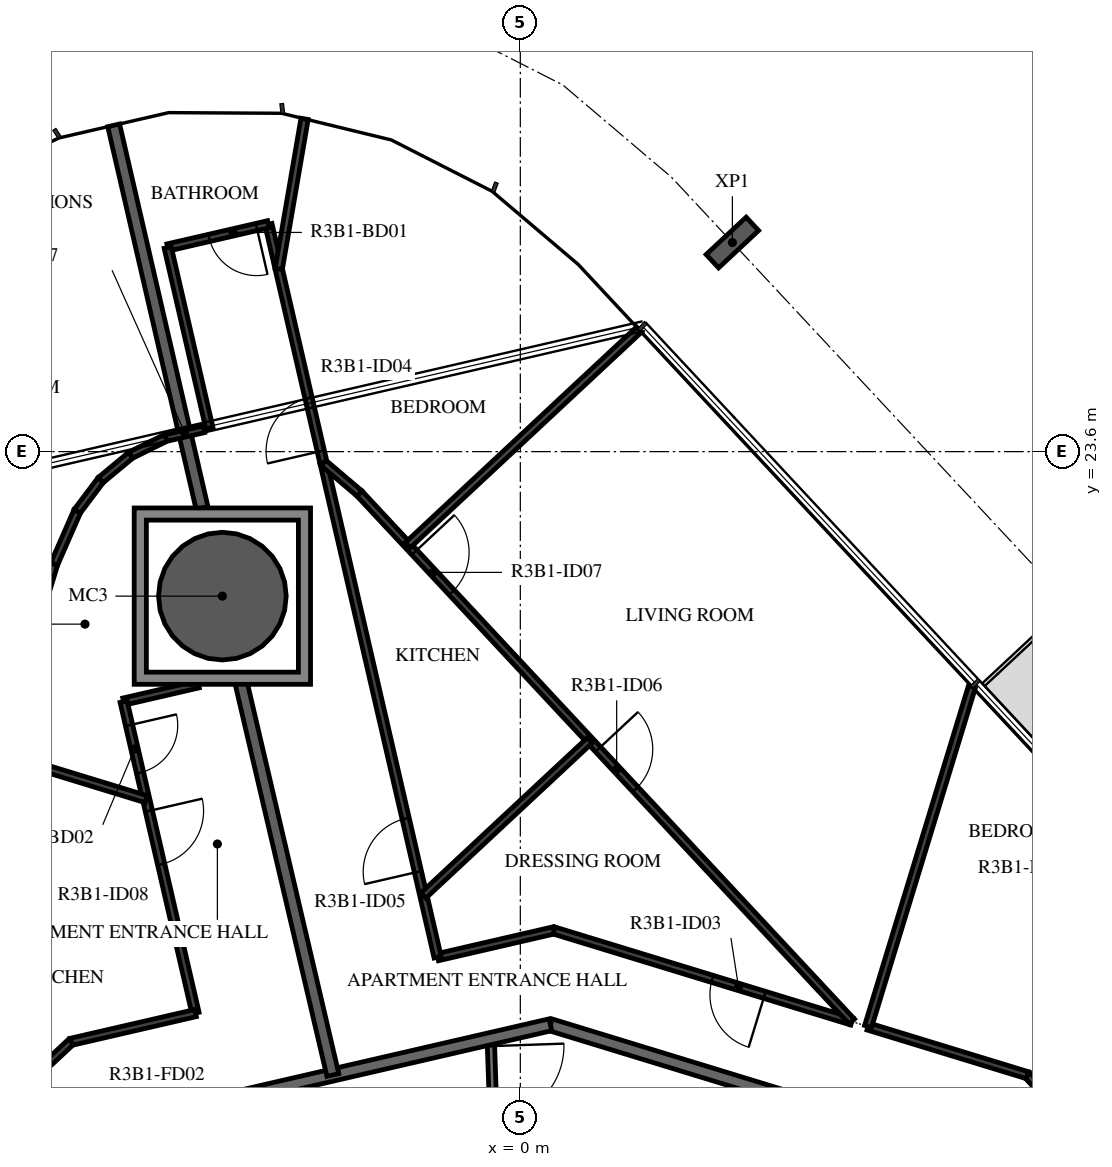
"""IFC4 building model, lengths in metres.
Left out: names, types, materials, properties, quantities, classifications, styles, units other than length and angle.
Written with IfcOpenShell. Run it as: python <this file> out.ifc"""

import sys

from ifc_helpers import new_model, si_unit, direction, frame, frame_2d, origin, origin_2d, place, context, subcontext, project, spatial, polyline, rectangle, hollow_circle, i_section, outline, extrude, element, fill, save


model = new_model("IFC4")
c1 = context("Model", 3, precision=1e-05, world=origin(), true_north=direction((0.0, 1.0)))
c2 = subcontext(c1, "Body", "Model", "MODEL_VIEW")
j1 = project(units=[si_unit("LENGTHUNIT", "METRE"), si_unit("PLANEANGLEUNIT", "RADIAN")], contexts=[c1])
p1 = place(None, origin())
s1 = spatial("IfcSite", under=j1, at=p1, CompositionType="ELEMENT")
p2 = place(p1, origin())
s2 = spatial("IfcBuilding", under=s1, at=p2, CompositionType="ELEMENT")
p3 = place(p2, frame((0.0, 0.0, 123.9)))
s3 = spatial("IfcBuildingStorey", under=s2, at=p3, CompositionType="ELEMENT", Elevation=123.9)
p4 = place(p3, frame((-4.9, 21.223, -0.38), z_axis=(0.0, 0.0, 1.0), x_axis=(1.0, 0.0, 0.0)))
e1 = element("IfcColumn", 1, at=p4, inside=s3, PredefinedType="COLUMN", context=c2, shape_type="SweptSolid", body=[
    extrude(hollow_circle(Radius=1.05, WallThickness=0.05, at=origin_2d()), origin(), (0.0, 0.0, 1.0), 3.5),
])
p5 = place(p3, frame((3.487, 27.039, -0.38), z_axis=(0.0, 0.0, 1.0), x_axis=(0.68199801865, -0.731354019992, 0.0)))
e2 = element("IfcColumn", 2, at=p5, inside=s3, PredefinedType="COLUMN", context=c2, shape_type="SweptSolid", body=[
    extrude(i_section(OverallWidth=0.3, OverallDepth=0.9, WebThickness=0.019, FlangeThickness=0.035, FilletRadius=0.03, at=origin_2d()), origin(), (0.0, 0.0, 1.0), 3.5),
])
p6 = place(p3, frame((-0.487, 13.948, 0.0), z_axis=(0.0, 0.0, 1.0), x_axis=(0.034859752231, -0.999392214135, 0.0)))
e3 = element("IfcWall", 3, at=p6, inside=s3, PredefinedType="PARTITIONING", context=c2, shape_type="SweptSolid", body=[
    extrude(rectangle(XDim=2.052, YDim=0.12, at=frame_2d((1.026, 0.0))), origin(), (0.0, 0.0, 1.0), 3.12),
])
p7 = place(p6, frame((0.125, 0.0, 0.0)))
e4 = element("IfcOpeningElement", 4, at=p7, cuts=e3, PredefinedType="OPENING", context=c2, shape_type="SweptSolid", body=[
    extrude(rectangle(XDim=1.2, YDim=2.1, at=frame_2d((0.6, 1.05))), frame((0.0, 0.07, 0.0), z_axis=(0.0, -1.0, 0.0), x_axis=(1.0, 0.0, 0.0)), (0.0, 0.0, 1.0), 0.14),
])
p8 = place(p3, frame((7.516, 12.028, 0.0), z_axis=(0.0, 0.0, 1.0), x_axis=(-0.956306642771, 0.292365533182, 0.0)))
e5 = element("IfcWall", 5, at=p8, inside=s3, PredefinedType="STANDARD", context=c2, shape_type="SweptSolid", body=[
    extrude(rectangle(XDim=7.342, YDim=0.2, at=frame_2d((3.671, 0.0))), origin(), (0.0, 0.0, 1.0), 3.12),
])
p9 = place(p3, frame((0.495, 14.175, 0.0), z_axis=(0.0, 0.0, 1.0), x_axis=(-0.974376622151, -0.224922649383, 0.0)))
e6 = element("IfcWall", 6, at=p9, inside=s3, PredefinedType="STANDARD", context=c2, shape_type="SweptSolid", body=[
    extrude(rectangle(XDim=7.342, YDim=0.2, at=frame_2d((3.671, 0.0))), origin(), (0.0, 0.0, 1.0), 3.12),
])
p10 = place(p9, frame((6.142, 0.0, 0.0)))
e7 = element("IfcOpeningElement", 7, at=p10, cuts=e6, PredefinedType="OPENING", context=c2, shape_type="SweptSolid", body=[
    extrude(rectangle(XDim=1.0, YDim=2.1, at=frame_2d((0.5, 1.05))), frame((0.0, 0.11, 0.0), z_axis=(0.0, -1.0, 0.0), x_axis=(1.0, 0.0, 0.0)), (0.0, 0.0, 1.0), 0.22),
])
p11 = place(p3, frame((-4.602, 19.839, 0.0), z_axis=(0.0, 0.0, 1.0), x_axis=(0.227891855607, -0.973686449607, 0.0)))
e8 = element("IfcWall", 8, at=p11, inside=s3, PredefinedType="STANDARD", context=c2, shape_type="SweptSolid", body=[
    extrude(rectangle(XDim=6.666, YDim=0.2, at=frame_2d((3.333, 0.0))), origin(), (0.0, 0.0, 1.0), 3.12),
])
p12 = place(p3, frame((-6.687, 28.966, 0.0), z_axis=(0.0, 0.0, 1.0), x_axis=(0.224945100086, -0.974371439415, 0.0)))
e9 = element("IfcWall", 9, at=p12, inside=s3, PredefinedType="STANDARD", context=c2, shape_type="SweptSolid", body=[
    extrude(rectangle(XDim=6.458, YDim=0.2, at=frame_2d((3.229, 0.0))), origin(), (0.0, 0.0, 1.0), 3.12),
])
p13 = place(p3, frame((-15.327, 14.481, 0.0), z_axis=(0.0, 0.0, 1.0), x_axis=(0.956303504869, -0.292375796837, 0.0)))
e10 = element("IfcWall", 10, at=p13, inside=s3, PredefinedType="STANDARD", context=c2, shape_type="SweptSolid", body=[
    extrude(rectangle(XDim=8.48, YDim=0.2, at=frame_2d((4.24, 0.0))), origin(), (0.0, 0.0, 1.0), 2.73),
])
p14 = place(p3, frame((13.254, 8.075, 0.0), z_axis=(0.0, 0.0, 1.0), x_axis=(-0.681995901471, 0.731355994285, 0.0)))
e11 = element("IfcWall", 11, at=p14, inside=s3, PredefinedType="PARTITIONING", context=c2, shape_type="SweptSolid", body=[
    extrude(rectangle(XDim=7.207, YDim=0.12, at=frame_2d((3.603, 0.0))), origin(), (0.0, 0.0, 1.0), 3.12),
])
p15 = place(p14, frame((4.672, 0.0, 0.0)))
e12 = element("IfcOpeningElement", 12, at=p15, cuts=e11, PredefinedType="OPENING", context=c2, shape_type="SweptSolid", body=[
    extrude(rectangle(XDim=0.9, YDim=2.1, at=frame_2d((0.45, 1.05))), frame((0.0, 0.07, 0.0), z_axis=(0.0, -1.0, 0.0), x_axis=(1.0, 0.0, 0.0)), (0.0, 0.0, 1.0), 0.14),
])
p16 = place(p3, frame((8.339, 13.345, 0.0), z_axis=(0.0, 0.0, 1.0), x_axis=(-0.956324586315, 0.292306834695, 0.0)))
e13 = element("IfcWall", 13, at=p16, inside=s3, PredefinedType="PARTITIONING", context=c2, shape_type="SweptSolid", body=[
    extrude(rectangle(XDim=2.74, YDim=0.12, at=frame_2d((1.37, 0.0))), origin(), (0.0, 0.0, 1.0), 3.12),
])
p17 = place(p3, frame((5.453, 14.228, 0.0), z_axis=(0.0, 0.0, 1.0), x_axis=(-0.95630868333, 0.292358858576, 0.0)))
e14 = element("IfcWall", 14, at=p17, inside=s3, PredefinedType="PARTITIONING", context=c2, shape_type="SweptSolid", body=[
    extrude(rectangle(XDim=5.127, YDim=0.12, at=frame_2d((2.564, 0.0))), origin(), (0.0, 0.0, 1.0), 3.12),
])
p18 = place(p17, frame((1.5, 0.0, 0.0)))
e15 = element("IfcOpeningElement", 15, at=p18, cuts=e14, PredefinedType="OPENING", context=c2, shape_type="SweptSolid", body=[
    extrude(rectangle(XDim=0.9, YDim=2.1, at=frame_2d((0.45, 1.05))), frame((0.0, 0.07, 0.0), z_axis=(0.0, -1.0, 0.0), x_axis=(1.0, 0.0, 0.0)), (0.0, 0.0, 1.0), 0.14),
])
p19 = place(p3, frame((0.549, 15.727, 0.0), z_axis=(0.0, 0.0, 1.0), x_axis=(-0.974374390785, -0.22493231556, 0.0)))
e16 = element("IfcWall", 16, at=p19, inside=s3, PredefinedType="PARTITIONING", context=c2, shape_type="SweptSolid", body=[
    extrude(rectangle(XDim=1.959, YDim=0.12, at=frame_2d((0.979, 0.0))), origin(), (0.0, 0.0, 1.0), 3.12),
])
p20 = place(p3, frame((-1.36, 15.286, 0.0), z_axis=(0.0, 0.0, 1.0), x_axis=(-0.224974943676, 0.97436454919, 0.0)))
e17 = element("IfcWall", 17, at=p20, inside=s3, PredefinedType="PARTITIONING", context=c2, shape_type="SweptSolid", body=[
    extrude(rectangle(XDim=8.341, YDim=0.12, at=frame_2d((4.17, 0.0))), origin(), (0.0, 0.0, 1.0), 3.12),
])
p21 = place(p20, frame((1.441, 0.0, 0.0)))
e18 = element("IfcOpeningElement", 18, at=p21, cuts=e17, PredefinedType="OPENING", context=c2, shape_type="SweptSolid", body=[
    extrude(rectangle(XDim=0.9, YDim=2.1, at=frame_2d((0.45, 1.05))), frame((0.0, 0.07, 0.0), z_axis=(0.0, -1.0, 0.0), x_axis=(1.0, 0.0, 0.0)), (0.0, 0.0, 1.0), 0.14),
])
p22 = place(p3, frame((-3.236, 23.413, 0.0), z_axis=(0.0, 0.0, 1.0), x_axis=(-0.224934720918, 0.97437383551, 0.0)))
e19 = element("IfcWall", 19, at=p22, inside=s3, PredefinedType="PARTITIONING", context=c2, shape_type="SweptSolid", body=[
    extrude(rectangle(XDim=4.03, YDim=0.12, at=frame_2d((2.015, 0.0))), origin(), (0.0, 0.0, 1.0), 3.12),
])
p23 = place(p22, frame((0.2, 0.0, 0.0)))
e20 = element("IfcOpeningElement", 20, at=p23, cuts=e19, PredefinedType="OPENING", context=c2, shape_type="SweptSolid", body=[
    extrude(rectangle(XDim=0.9, YDim=2.1, at=frame_2d((0.45, 1.05))), frame((0.0, 0.07, 0.0), z_axis=(0.0, -1.0, 0.0), x_axis=(1.0, 0.0, 0.0)), (0.0, 0.0, 1.0), 0.14),
])
p24 = place(p3, frame((-4.143, 27.34, 0.0), z_axis=(0.0, 0.0, 1.0), x_axis=(-0.974345183359, -0.22505880046, 0.0)))
e21 = element("IfcWall", 21, at=p24, inside=s3, PredefinedType="PARTITIONING", context=c2, shape_type="SweptSolid", body=[
    extrude(rectangle(XDim=1.7, YDim=0.12, at=frame_2d((0.85, 0.0))), origin(), (0.0, 0.0, 1.0), 3.12),
])
p25 = place(p24, frame((0.2, 0.0, 0.0)))
e22 = element("IfcOpeningElement", 22, at=p25, cuts=e21, PredefinedType="OPENING", context=c2, shape_type="SweptSolid", body=[
    extrude(rectangle(XDim=0.8, YDim=2.1, at=frame_2d((0.4, 1.05))), frame((0.0, 0.07, 0.0), z_axis=(0.0, -1.0, 0.0), x_axis=(1.0, 0.0, 0.0)), (0.0, 0.0, 1.0), 0.14),
])
p26 = place(p3, frame((-5.799, 26.957, 0.0), z_axis=(0.0, 0.0, 1.0), x_axis=(0.224876960008, -0.974387167843, 0.0)))
e23 = element("IfcWall", 23, at=p26, inside=s3, PredefinedType="PARTITIONING", context=c2, shape_type="SweptSolid", body=[
    extrude(rectangle(XDim=3.065, YDim=0.12, at=frame_2d((1.532, 0.0))), origin(), (0.0, 0.0, 1.0), 3.12),
])
p27 = place(p3, frame((-5.205, 23.971, 0.0), z_axis=(0.0, 0.0, 1.0), x_axis=(-0.974410422398, -0.224776174722, 0.0)))
e24 = element("IfcWall", 24, at=p27, inside=s3, PredefinedType="PARTITIONING", context=c2, shape_type="SweptSolid", body=[
    extrude(rectangle(XDim=0.642, YDim=0.12, at=frame_2d((0.321, 0.0))), origin(), (0.0, 0.0, 1.0), 3.12),
])
p28 = place(p3, frame((7.427, 19.734, 0.0), z_axis=(0.0, 0.0, 1.0), x_axis=(-0.292365007065, -0.956306803617, 0.0)))
e25 = element("IfcWall", 25, at=p28, inside=s3, PredefinedType="PARTITIONING", context=c2, shape_type="SweptSolid", body=[
    extrude(rectangle(XDim=5.844, YDim=0.12, at=frame_2d((2.922, 0.0))), origin(), (0.0, 0.0, 1.0), 3.12),
])
p29 = place(p3, frame((-2.646, 22.912, 0.0), z_axis=(0.0, 0.0, 1.0), x_axis=(0.68200318122, -0.731349205788, 0.0)))
e26 = element("IfcWall", 26, at=p29, inside=s3, PredefinedType="PARTITIONING", context=c2, shape_type="SweptSolid", body=[
    extrude(rectangle(XDim=11.874, YDim=0.12, at=frame_2d((5.937, 0.0))), origin(), (0.0, 0.0, 1.0), 3.12),
])
p30 = place(p29, frame((5.752, 0.0, 0.0)))
e27 = element("IfcOpeningElement", 27, at=p30, cuts=e26, PredefinedType="OPENING", context=c2, shape_type="SweptSolid", body=[
    extrude(rectangle(XDim=0.9, YDim=2.1, at=frame_2d((0.45, 1.05))), frame((0.0, 0.07, 0.0), z_axis=(0.0, -1.0, 0.0), x_axis=(1.0, 0.0, 0.0)), (0.0, 0.0, 1.0), 0.14),
])
p31 = place(p29, frame((1.324, 0.0, 0.0)))
e28 = element("IfcOpeningElement", 28, at=p31, cuts=e26, PredefinedType="OPENING", context=c2, shape_type="SweptSolid", body=[
    extrude(rectangle(XDim=0.9, YDim=2.1, at=frame_2d((0.45, 1.05))), frame((0.0, 0.07, 0.0), z_axis=(0.0, -1.0, 0.0), x_axis=(1.0, 0.0, 0.0)), (0.0, 0.0, 1.0), 0.14),
])
p32 = place(p3, frame((1.951, 25.607, 0.0), z_axis=(0.0, 0.0, 1.0), x_axis=(-0.73134872518, -0.682003696601, 0.0)))
e29 = element("IfcWall", 29, at=p32, inside=s3, PredefinedType="PARTITIONING", context=c2, shape_type="SweptSolid", body=[
    extrude(rectangle(XDim=5.2, YDim=0.12, at=frame_2d((2.6, 0.0))), origin(), (0.0, 0.0, 1.0), 2.73),
])
p33 = place(p3, frame((1.141, 18.851, 0.0), z_axis=(0.0, 0.0, 1.0), x_axis=(-0.731352611136, -0.68199952946, 0.0)))
e30 = element("IfcWall", 30, at=p33, inside=s3, PredefinedType="PARTITIONING", context=c2, shape_type="SweptSolid", body=[
    extrude(rectangle(XDim=3.74, YDim=0.12, at=frame_2d((1.87, 0.0))), origin(), (0.0, 0.0, 1.0), 3.12),
])
p34 = place(p3, frame((-3.236, 23.413, 0.0), z_axis=(0.0, 0.0, 1.0), x_axis=(0.762429029489, -0.647071846855, 0.0)))
e31 = element("IfcWall", 31, at=p34, inside=s3, PredefinedType="PARTITIONING", context=c2, shape_type="SweptSolid", body=[
    extrude(rectangle(XDim=0.775, YDim=0.12, at=frame_2d((0.387, 0.0))), origin(), (0.0, 0.0, 1.0), 3.12),
])
p35 = place(p3, frame((-3.548, 29.072, 0.0), z_axis=(0.0, 0.0, 1.0), x_axis=(-0.169756715849, -0.985486000623, 0.0)))
e32 = element("IfcWall", 32, at=p35, inside=s3, PredefinedType="PARTITIONING", context=c2, shape_type="SweptSolid", body=[
    extrude(rectangle(XDim=2.504, YDim=0.12, at=frame_2d((1.252, 0.0))), origin(), (0.0, 0.0, 1.0), 2.73),
])
p36 = place(p3, frame((-5.293, 19.773, 0.0), z_axis=(0.0, 0.0, 1.0), x_axis=(-0.974391195695, -0.224859506699, 0.0)))
e33 = element("IfcWall", 33, at=p36, inside=s3, PredefinedType="PARTITIONING", context=c2, shape_type="SweptSolid", body=[
    extrude(rectangle(XDim=1.264, YDim=0.12, at=frame_2d((0.632, 0.0))), origin(), (0.0, 0.0, 1.0), 3.12),
])
p37 = place(p3, frame((-6.524, 19.489, 0.0), z_axis=(0.0, 0.0, 1.0), x_axis=(0.22494768659, -0.974370842286, 0.0)))
e34 = element("IfcWall", 34, at=p37, inside=s3, PredefinedType="PARTITIONING", context=c2, shape_type="SweptSolid", body=[
    extrude(rectangle(XDim=5.257, YDim=0.12, at=frame_2d((2.629, 0.0))), origin(), (0.0, 0.0, 1.0), 3.12),
])
p38 = place(p37, frame((0.4, 0.0, 0.0)))
e35 = element("IfcOpeningElement", 35, at=p38, cuts=e34, PredefinedType="OPENING", context=c2, shape_type="SweptSolid", body=[
    extrude(rectangle(XDim=0.8, YDim=2.1, at=frame_2d((0.4, 1.05))), frame((0.0, 0.07, 0.0), z_axis=(0.0, -1.0, 0.0), x_axis=(1.0, 0.0, 0.0)), (0.0, 0.0, 1.0), 0.14),
])
p39 = place(p37, frame((1.846, 0.0, 0.0)))
e36 = element("IfcOpeningElement", 36, at=p39, cuts=e34, PredefinedType="OPENING", context=c2, shape_type="SweptSolid", body=[
    extrude(rectangle(XDim=0.9, YDim=2.1, at=frame_2d((0.45, 1.05))), frame((0.0, 0.07, 0.0), z_axis=(0.0, -1.0, 0.0), x_axis=(1.0, 0.0, 0.0)), (0.0, 0.0, 1.0), 0.14),
])
p40 = place(p3, frame((-5.342, 14.367, 0.0), z_axis=(0.0, 0.0, 1.0), x_axis=(-0.974367677287, -0.224961395484, 0.0)))
e37 = element("IfcWall", 37, at=p40, inside=s3, PredefinedType="PARTITIONING", context=c2, shape_type="SweptSolid", body=[
    extrude(rectangle(XDim=2.1, YDim=0.12, at=frame_2d((1.05, 0.0))), origin(), (0.0, 0.0, 1.0), 3.12),
])
p41 = place(p3, frame((-7.388, 13.894, 0.0), z_axis=(0.0, 0.0, 1.0), x_axis=(-0.731357186721, -0.681994622729, 0.0)))
e38 = element("IfcWall", 38, at=p41, inside=s3, PredefinedType="PARTITIONING", context=c2, shape_type="SweptSolid", body=[
    extrude(rectangle(XDim=8.146, YDim=0.12, at=frame_2d((4.073, 0.0))), origin(), (0.0, 0.0, 1.0), 3.12),
])
p42 = place(p41, frame((2.432, 0.0, 0.0)))
e39 = element("IfcOpeningElement", 39, at=p42, cuts=e38, PredefinedType="OPENING", context=c2, shape_type="SweptSolid", body=[
    extrude(rectangle(XDim=0.9, YDim=2.1, at=frame_2d((0.45, 1.05))), frame((0.0, 0.07, 0.0), z_axis=(0.0, -1.0, 0.0), x_axis=(1.0, 0.0, 0.0)), (0.0, 0.0, 1.0), 0.14),
])
p43 = place(p41, frame((7.046, 0.0, 0.0)))
e40 = element("IfcOpeningElement", 40, at=p43, cuts=e38, PredefinedType="OPENING", context=c2, shape_type="SweptSolid", body=[
    extrude(rectangle(XDim=0.9, YDim=2.1, at=frame_2d((0.45, 1.05))), frame((0.0, 0.07, 0.0), z_axis=(0.0, -1.0, 0.0), x_axis=(1.0, 0.0, 0.0)), (0.0, 0.0, 1.0), 0.14),
])
p44 = place(p3, frame((-10.354, 12.961, 0.0), z_axis=(0.0, 0.0, 1.0), x_axis=(0.292379778045, 0.956302287663, 0.0)))
e41 = element("IfcWall", 41, at=p44, inside=s3, PredefinedType="PARTITIONING", context=c2, shape_type="SweptSolid", body=[
    extrude(rectangle(XDim=9.194, YDim=0.12, at=frame_2d((4.597, 0.0))), origin(), (0.0, 0.0, 1.0), 3.12),
])
p45 = place(p44, frame((0.2, 0.0, 0.0)))
e42 = element("IfcOpeningElement", 42, at=p45, cuts=e41, PredefinedType="OPENING", context=c2, shape_type="SweptSolid", body=[
    extrude(rectangle(XDim=0.9, YDim=2.1, at=frame_2d((0.45, 1.05))), frame((0.0, 0.07, 0.0), z_axis=(0.0, -1.0, 0.0), x_axis=(1.0, 0.0, 0.0)), (0.0, 0.0, 1.0), 0.14),
])
p46 = place(p3, frame((-7.666, 21.753, 0.0), z_axis=(0.0, 0.0, 1.0), x_axis=(0.401562829944, 0.915831476642, 0.0)))
e43 = element("IfcWall", 43, at=p46, inside=s3, PredefinedType="PARTITIONING", context=c2, shape_type="SweptSolid", body=[
    extrude(rectangle(XDim=0.947, YDim=0.12, at=frame_2d((0.473, 0.0))), origin(), (0.0, 0.0, 1.0), 3.12),
])
p47 = place(p3, frame((-7.286, 22.62, 0.0), z_axis=(0.0, 0.0, 1.0), x_axis=(0.601702575527, 0.798720233, 0.0)))
e44 = element("IfcWall", 44, at=p47, inside=s3, PredefinedType="PARTITIONING", context=c2, shape_type="SweptSolid", body=[
    extrude(rectangle(XDim=0.642, YDim=0.12, at=frame_2d((0.321, 0.0))), origin(), (0.0, 0.0, 1.0), 3.12),
])
p48 = place(p3, frame((-6.9, 23.132, 0.0), z_axis=(0.0, 0.0, 1.0), x_axis=(0.769653132962, 0.638462258025, 0.0)))
e45 = element("IfcWall", 45, at=p48, inside=s3, PredefinedType="PARTITIONING", context=c2, shape_type="SweptSolid", body=[
    extrude(rectangle(XDim=0.642, YDim=0.12, at=frame_2d((0.321, 0.0))), origin(), (0.0, 0.0, 1.0), 3.12),
])
p49 = place(p3, frame((-6.406, 23.542, 0.0), z_axis=(0.0, 0.0, 1.0), x_axis=(0.896245703043, 0.44355793283, 0.0)))
e46 = element("IfcWall", 46, at=p49, inside=s3, PredefinedType="PARTITIONING", context=c2, shape_type="SweptSolid", body=[
    extrude(rectangle(XDim=0.642, YDim=0.12, at=frame_2d((0.321, 0.0))), origin(), (0.0, 0.0, 1.0), 3.12),
])
p50 = place(p3, frame((-8.618, 18.639, 0.0), z_axis=(0.0, 0.0, 1.0), x_axis=(0.956305961168, -0.292367762647, 0.0)))
e47 = element("IfcWall", 47, at=p50, inside=s3, PredefinedType="PARTITIONING", context=c2, shape_type="SweptSolid", body=[
    extrude(rectangle(XDim=2.577, YDim=0.12, at=frame_2d((1.289, 0.0))), origin(), (0.0, 0.0, 1.0), 3.12),
])
p51 = place(p3, origin())
e48 = element("IfcWall", 48, at=p51, inside=s3, PredefinedType="STANDARD", context=c2, shape_type="SweptSolid", body=[
    extrude(outline(polyline([(-3.45, 22.674), (-3.45, 19.773), (-6.35, 19.773), (-6.35, 22.674), (-3.45, 22.674)]), holes=[polyline([(-6.15, 19.973), (-3.65, 19.973), (-3.65, 22.473), (-6.15, 22.473), (-6.15, 19.973)])]), origin(), (0.0, 0.0, 1.0), 3.12),
])
p52 = place(p18, origin())
e49 = element("IfcDoor", 49, at=p52, inside=s3, OperationType="SINGLE_SWING_RIGHT", PredefinedType="DOOR", context=c2, shape_type="SweptSolid", body=[
    extrude(rectangle(XDim=0.9, YDim=2.1, at=frame_2d((0.45, 1.05))), frame((0.0, 0.025, 0.0), z_axis=(0.0, -1.0, 0.0), x_axis=(1.0, 0.0, 0.0)), (0.0, 0.0, 1.0), 0.05),
])
fill(e15, e49)
p53 = place(p23, origin())
e50 = element("IfcDoor", 50, at=p53, inside=s3, OperationType="SINGLE_SWING_LEFT", PredefinedType="DOOR", context=c2, shape_type="SweptSolid", body=[
    extrude(rectangle(XDim=0.9, YDim=2.1, at=frame_2d((0.45, 1.05))), frame((0.0, 0.025, 0.0), z_axis=(0.0, -1.0, 0.0), x_axis=(1.0, 0.0, 0.0)), (0.0, 0.0, 1.0), 0.05),
])
fill(e20, e50)
p54 = place(p21, origin())
e51 = element("IfcDoor", 51, at=p54, inside=s3, OperationType="SINGLE_SWING_RIGHT", PredefinedType="DOOR", context=c2, shape_type="SweptSolid", body=[
    extrude(rectangle(XDim=0.9, YDim=2.1, at=frame_2d((0.45, 1.05))), frame((0.0, 0.025, 0.0), z_axis=(0.0, -1.0, 0.0), x_axis=(1.0, 0.0, 0.0)), (0.0, 0.0, 1.0), 0.05),
])
fill(e18, e51)
p55 = place(p25, origin())
e52 = element("IfcDoor", 52, at=p55, inside=s3, OperationType="SINGLE_SWING_RIGHT", PredefinedType="DOOR", context=c2, shape_type="SweptSolid", body=[
    extrude(rectangle(XDim=0.8, YDim=2.1, at=frame_2d((0.4, 1.05))), frame((0.0, 0.025, 0.0), z_axis=(0.0, -1.0, 0.0), x_axis=(1.0, 0.0, 0.0)), (0.0, 0.0, 1.0), 0.05),
])
fill(e22, e52)
p56 = place(p30, origin())
e53 = element("IfcDoor", 53, at=p56, inside=s3, OperationType="SINGLE_SWING_RIGHT", PredefinedType="DOOR", context=c2, shape_type="SweptSolid", body=[
    extrude(rectangle(XDim=0.9, YDim=2.1, at=frame_2d((0.45, 1.05))), frame((0.0, 0.025, 0.0), z_axis=(0.0, -1.0, 0.0), x_axis=(1.0, 0.0, 0.0)), (0.0, 0.0, 1.0), 0.05),
])
fill(e27, e53)
p57 = place(p31, origin())
e54 = element("IfcDoor", 54, at=p57, inside=s3, OperationType="SINGLE_SWING_LEFT", PredefinedType="DOOR", context=c2, shape_type="SweptSolid", body=[
    extrude(rectangle(XDim=0.9, YDim=2.1, at=frame_2d((0.45, 1.05))), frame((0.0, 0.025, 0.0), z_axis=(0.0, -1.0, 0.0), x_axis=(1.0, 0.0, 0.0)), (0.0, 0.0, 1.0), 0.05),
])
fill(e28, e54)
p58 = place(p38, origin())
e55 = element("IfcDoor", 55, at=p58, inside=s3, OperationType="SINGLE_SWING_LEFT", PredefinedType="DOOR", context=c2, shape_type="SweptSolid", body=[
    extrude(rectangle(XDim=0.8, YDim=2.1, at=frame_2d((0.4, 1.05))), frame((0.0, 0.025, 0.0), z_axis=(0.0, -1.0, 0.0), x_axis=(1.0, 0.0, 0.0)), (0.0, 0.0, 1.0), 0.05),
])
fill(e35, e55)
p59 = place(p39, origin())
e56 = element("IfcDoor", 56, at=p59, inside=s3, OperationType="SINGLE_SWING_LEFT", PredefinedType="DOOR", context=c2, shape_type="SweptSolid", body=[
    extrude(rectangle(XDim=0.9, YDim=2.1, at=frame_2d((0.45, 1.05))), frame((0.0, 0.025, 0.0), z_axis=(0.0, -1.0, 0.0), x_axis=(1.0, 0.0, 0.0)), (0.0, 0.0, 1.0), 0.05),
])
fill(e36, e56)
p60 = place(p7, origin())
e57 = element("IfcDoor", 57, at=p60, inside=s3, OperationType="DOUBLE_DOOR_SINGLE_SWING", PredefinedType="DOOR", context=c2, shape_type="SweptSolid", body=[
    extrude(rectangle(XDim=1.2, YDim=2.1, at=frame_2d((0.6, 1.05))), frame((0.0, 0.025, 0.0), z_axis=(0.0, -1.0, 0.0), x_axis=(1.0, 0.0, 0.0)), (0.0, 0.0, 1.0), 0.05),
])
fill(e4, e57)
save(model, sys.argv[1])
